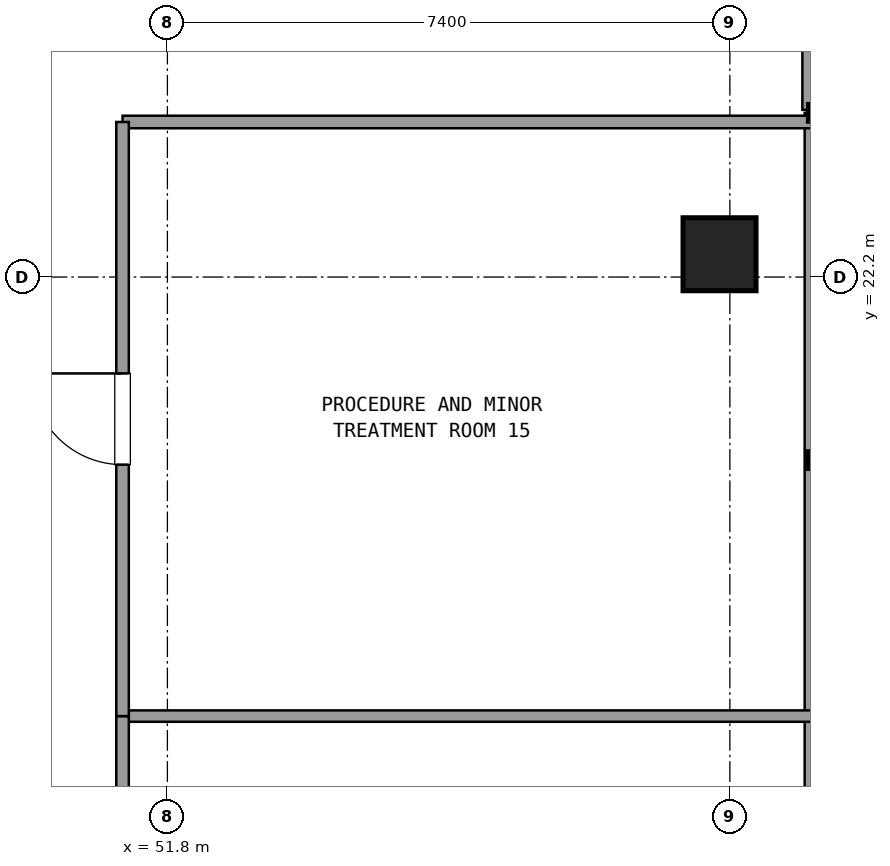
"""IFC4 building model, lengths in metres.
Left out: names, types, materials, properties, quantities, classifications, styles, units other than length and angle.
Written with IfcOpenShell. Run it as: python <this file> out.ifc"""

import sys

from ifc_helpers import new_model, si_unit, direction, frame, frame_2d, origin, origin_2d, place, context, subcontext, project, spatial, rectangle, extrude, element, fill, save


model = new_model("IFC4")
c1 = context("Model", 3, precision=1e-05, world=origin(), true_north=direction((0.0, 1.0)))
c2 = subcontext(c1, "Body", "Model", "MODEL_VIEW")
j1 = project(units=[si_unit("LENGTHUNIT", "METRE"), si_unit("PLANEANGLEUNIT", "RADIAN")], contexts=[c1])
p1 = place(None, origin())
s1 = spatial("IfcSite", under=j1, at=p1, CompositionType="ELEMENT")
p2 = place(p1, origin())
s2 = spatial("IfcBuilding", under=s1, at=p2, CompositionType="ELEMENT")
p3 = place(p2, frame((0.0, 0.0, 142.02)))
s3 = spatial("IfcBuildingStorey", under=s2, at=p3, CompositionType="ELEMENT", Elevation=142.02)
p4 = place(p3, frame((59.064, 22.5, 0.0), z_axis=(0.0, 0.0, 1.0), x_axis=(1.0, 0.0, 0.0)))
e1 = element("IfcColumn", 1, at=p4, inside=s3, PredefinedType="COLUMN", context=c2, shape_type="SweptSolid", body=[
    extrude(rectangle(XDim=0.96, YDim=0.96, at=origin_2d()), origin(), (0.0, 0.0, 1.0), 3.6),
])
p5 = place(p3, frame((60.304, 24.4, 0.0), z_axis=(0.0, 0.0, 1.0), x_axis=(0.0, 1.0, 0.0)))
e2 = element("IfcWall", 2, at=p5, inside=s3, PredefinedType="SOLIDWALL", context=c2, shape_type="SweptSolid", body=[
    extrude(rectangle(XDim=3.0, YDim=0.3, at=frame_2d((1.5, 0.0))), origin(), (0.0, 0.0, 1.0), 2.67),
])
p6 = place(p5, frame((0.9, 0.0, 0.0)))
e3 = element("IfcOpeningElement", 3, at=p6, cuts=e2, PredefinedType="OPENING", context=c2, shape_type="SweptSolid", body=[
    extrude(rectangle(XDim=1.2, YDim=2.2, at=frame_2d((0.6, 1.1))), frame((0.0, 0.16, 0.0), z_axis=(0.0, -1.0, 0.0), x_axis=(1.0, 0.0, 0.0)), (0.0, 0.0, 1.0), 0.32),
])
p7 = place(p3, frame((60.304, 10.655, 0.0), z_axis=(0.0, 0.0, 1.0), x_axis=(0.0, 1.0, 0.0)))
e4 = element("IfcWall", 4, at=p7, inside=s3, PredefinedType="SOLIDWALL", context=c2, shape_type="SweptSolid", body=[
    extrude(rectangle(XDim=13.705, YDim=0.24, at=frame_2d((6.853, 0.0))), origin(), (0.0, 0.0, 1.0), 0.85),
])
p8 = place(p3, frame((51.21, 24.24, 0.0), z_axis=(0.0, 0.0, 1.0), x_axis=(1.0, 0.0, 0.0)))
e5 = element("IfcWall", 5, at=p8, inside=s3, PredefinedType="PARTITIONING", context=c2, shape_type="SweptSolid", body=[
    extrude(rectangle(XDim=9.074, YDim=0.165, at=frame_2d((4.537, 0.0))), origin(), (0.0, 0.0, 1.0), 2.61),
])
p9 = place(p3, frame((51.21, 16.424, 0.0), z_axis=(0.0, 0.0, 1.0), x_axis=(1.0, 0.0, 0.0)))
e6 = element("IfcWall", 6, at=p9, inside=s3, PredefinedType="PARTITIONING", context=c2, shape_type="SweptSolid", body=[
    extrude(rectangle(XDim=9.074, YDim=0.15, at=frame_2d((4.537, 0.0))), origin(), (0.0, 0.0, 1.0), 2.61),
])
p10 = place(p3, frame((51.21, 4.7, 0.0), z_axis=(0.0, 0.0, 1.0), x_axis=(0.0, 1.0, 0.0)))
e7 = element("IfcWall", 7, at=p10, inside=s3, PredefinedType="PARTITIONING", context=c2, shape_type="SweptSolid", body=[
    extrude(rectangle(XDim=11.724, YDim=0.165, at=frame_2d((5.862, 0.0))), origin(), (0.0, 0.0, 1.0), 2.61),
])
p11 = place(p10, frame((5.262, 0.0, 0.0)))
e8 = element("IfcOpeningElement", 8, at=p11, cuts=e7, PredefinedType="OPENING", context=c2, shape_type="SweptSolid", body=[
    extrude(rectangle(XDim=1.2, YDim=2.15, at=frame_2d((0.6, 1.075))), frame((0.0, 0.093, 0.0), z_axis=(0.0, -1.0, 0.0), x_axis=(1.0, 0.0, 0.0)), (0.0, 0.0, 1.0), 0.185),
])
p12 = place(p3, frame((51.21, 16.424, 0.0), z_axis=(0.0, 0.0, 1.0), x_axis=(0.0, 1.0, 0.0)))
e9 = element("IfcWall", 9, at=p12, inside=s3, PredefinedType="PARTITIONING", context=c2, shape_type="SweptSolid", body=[
    extrude(rectangle(XDim=7.816, YDim=0.165, at=frame_2d((3.908, 0.0))), origin(), (0.0, 0.0, 1.0), 2.61),
])
p13 = place(p12, frame((3.308, 0.0, 0.0)))
e10 = element("IfcOpeningElement", 10, at=p13, cuts=e9, PredefinedType="OPENING", context=c2, shape_type="SweptSolid", body=[
    extrude(rectangle(XDim=1.2, YDim=2.15, at=frame_2d((0.6, 1.075))), frame((0.0, 0.093, 0.0), z_axis=(0.0, -1.0, 0.0), x_axis=(1.0, 0.0, 0.0)), (0.0, 0.0, 1.0), 0.185),
])
p14 = place(p13, origin())
e11 = element("IfcDoor", 11, at=p14, inside=s3, OperationType="SINGLE_SWING_RIGHT", PredefinedType="DOOR", context=c2, shape_type="SweptSolid", body=[
    extrude(rectangle(XDim=1.2, YDim=2.15, at=frame_2d((0.6, 1.075))), frame((0.0, 0.025, 0.0), z_axis=(0.0, -1.0, 0.0), x_axis=(1.0, 0.0, 0.0)), (0.0, 0.0, 1.0), 0.05),
])
fill(e10, e11)
save(model, sys.argv[1])
